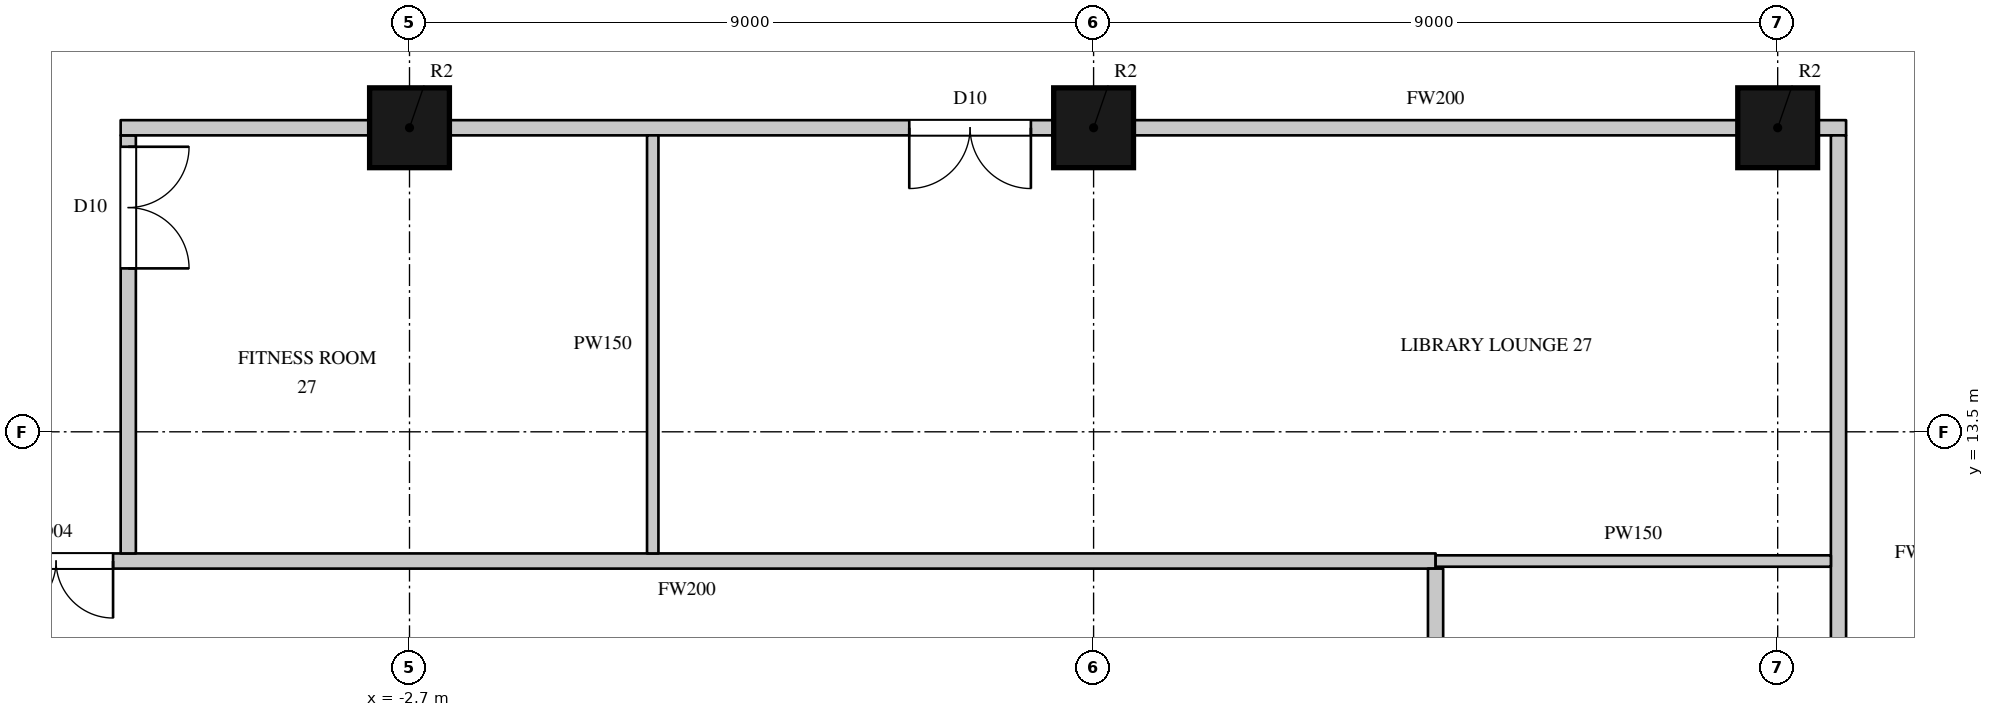
"""IFC4 building model, lengths in metres.
Left out: names, types, materials, properties, quantities, classifications, styles, units other than length and angle.
Written with IfcOpenShell. Run it as: python <this file> out.ifc"""

import sys

from ifc_helpers import new_model, si_unit, direction, frame, frame_2d, origin, origin_2d, place, context, subcontext, project, spatial, rectangle, circle, extrude, element, fill, save


model = new_model("IFC4")
c1 = context("Model", 3, precision=1e-05, world=origin(), true_north=direction((0.0, 1.0)))
c2 = subcontext(c1, "Body", "Model", "MODEL_VIEW")
j1 = project(units=[si_unit("LENGTHUNIT", "METRE"), si_unit("PLANEANGLEUNIT", "RADIAN")], contexts=[c1])
p1 = place(None, origin())
s1 = spatial("IfcSite", under=j1, at=p1, CompositionType="ELEMENT")
p2 = place(p1, origin())
s2 = spatial("IfcBuilding", under=s1, at=p2, CompositionType="ELEMENT")
p3 = place(p2, frame((0.0, 0.0, 127.5)))
s3 = spatial("IfcBuildingStorey", under=s2, at=p3, CompositionType="ELEMENT", Elevation=127.5)
for number, where, z_axis, x_axis in (
    (1, (-2.7, 17.5, 0.0), (0.0, 0.0, 1.0), (1.0, 0.0, 0.0)),
    (2, (6.3, 17.5, 0.0), (0.0, 0.0, 1.0), (1.0, 0.0, 0.0)),
    (3, (15.3, 17.5, 0.0), (0.0, 0.0, 1.0), (1.0, 0.0, 0.0)),
):
    element("IfcColumn", number, at=place(p3, frame(where, z_axis=z_axis, x_axis=x_axis)), inside=s3, PredefinedType="COLUMN", context=c2, shape_type="SweptSolid", body=[
        extrude(circle(Radius=0.525, at=origin_2d()), origin(), (0.0, 0.0, 1.0), 3.6),
    ])
p4 = place(p3, frame((-8.9, 11.8, 0.0), z_axis=(0.0, 0.0, 1.0), x_axis=(1.0, 0.0, 0.0)))
e4 = element("IfcWall", 4, at=p4, inside=s3, PredefinedType="PARTITIONING", context=c2, shape_type="SweptSolid", body=[
    extrude(rectangle(XDim=19.7, YDim=0.2, at=frame_2d((9.85, 0.0))), origin(), (0.0, 0.0, 1.0), 3.3),
])
p5 = place(p4, frame((0.8, 0.0, 0.0)))
e5 = element("IfcOpeningElement", 5, at=p5, cuts=e4, PredefinedType="OPENING", context=c2, shape_type="SweptSolid", body=[
    extrude(rectangle(XDim=1.5, YDim=2.2, at=frame_2d((0.75, 1.1))), frame((0.0, 0.11, 0.0), z_axis=(0.0, -1.0, 0.0), x_axis=(1.0, 0.0, 0.0)), (0.0, 0.0, 1.0), 0.22),
])
p6 = place(p3, frame((-6.4, 11.9, 0.0), z_axis=(0.0, 0.0, 1.0), x_axis=(0.0, 1.0, 0.0)))
e6 = element("IfcWall", 6, at=p6, inside=s3, PredefinedType="PARTITIONING", context=c2, shape_type="SweptSolid", body=[
    extrude(rectangle(XDim=5.5, YDim=0.2, at=frame_2d((2.75, 0.0))), origin(), (0.0, 0.0, 1.0), 3.3),
])
p7 = place(p6, frame((3.75, 0.0, 0.0)))
e7 = element("IfcOpeningElement", 7, at=p7, cuts=e6, PredefinedType="OPENING", context=c2, shape_type="SweptSolid", body=[
    extrude(rectangle(XDim=1.6, YDim=2.4, at=frame_2d((0.8, 1.2))), frame((0.0, 0.11, 0.0), z_axis=(0.0, -1.0, 0.0), x_axis=(1.0, 0.0, 0.0)), (0.0, 0.0, 1.0), 0.22),
])
p8 = place(p3, frame((-6.5, 17.5, 0.0), z_axis=(0.0, 0.0, 1.0), x_axis=(1.0, 0.0, 0.0)))
e8 = element("IfcWall", 8, at=p8, inside=s3, PredefinedType="PARTITIONING", context=c2, shape_type="SweptSolid", body=[
    extrude(rectangle(XDim=3.275, YDim=0.2, at=frame_2d((1.637, 0.0))), origin(), (0.0, 0.0, 1.0), 2.75),
])
p9 = place(p3, frame((-2.175, 17.5, 0.0), z_axis=(0.0, 0.0, 1.0), x_axis=(1.0, 0.0, 0.0)))
e9 = element("IfcWall", 9, at=p9, inside=s3, PredefinedType="PARTITIONING", context=c2, shape_type="SweptSolid", body=[
    extrude(rectangle(XDim=7.95, YDim=0.2, at=frame_2d((3.975, 0.0))), origin(), (0.0, 0.0, 1.0), 2.75),
])
p10 = place(p9, frame((6.05, 0.0, 0.0)))
e10 = element("IfcOpeningElement", 10, at=p10, cuts=e9, PredefinedType="OPENING", context=c2, shape_type="SweptSolid", body=[
    extrude(rectangle(XDim=1.6, YDim=2.4, at=frame_2d((0.8, 1.2))), frame((0.0, 0.11, 0.0), z_axis=(0.0, -1.0, 0.0), x_axis=(1.0, 0.0, 0.0)), (0.0, 0.0, 1.0), 0.22),
])
p11 = place(p3, frame((6.825, 17.5, 0.0), z_axis=(0.0, 0.0, 1.0), x_axis=(1.0, 0.0, 0.0)))
e11 = element("IfcWall", 11, at=p11, inside=s3, PredefinedType="PARTITIONING", context=c2, shape_type="SweptSolid", body=[
    extrude(rectangle(XDim=7.95, YDim=0.2, at=frame_2d((3.975, 0.0))), origin(), (0.0, 0.0, 1.0), 2.75),
])
p12 = place(p3, frame((15.825, 17.5, 0.0), z_axis=(0.0, 0.0, 1.0), x_axis=(1.0, 0.0, 0.0)))
e12 = element("IfcWall", 12, at=p12, inside=s3, PredefinedType="PARTITIONING", context=c2, shape_type="SweptSolid", body=[
    extrude(rectangle(XDim=0.375, YDim=0.2, at=frame_2d((0.188, 0.0))), origin(), (0.0, 0.0, 1.0), 3.3),
])
p13 = place(p3, frame((10.799, -12.5, 0.0), z_axis=(0.0, 0.0, 1.0), x_axis=(0.0, 1.0, 0.0)))
e13 = element("IfcWall", 13, at=p13, inside=s3, PredefinedType="PARTITIONING", context=c2, shape_type="SweptSolid", body=[
    extrude(rectangle(XDim=24.2, YDim=0.2, at=frame_2d((12.1, 0.0))), origin(), (0.0, 0.0, 1.0), 3.3),
])
p14 = place(p13, frame((13.15, 0.0, 0.0)))
e14 = element("IfcOpeningElement", 14, at=p14, cuts=e13, PredefinedType="OPENING", context=c2, shape_type="SweptSolid", body=[
    extrude(rectangle(XDim=1.5, YDim=2.2, at=frame_2d((0.75, 1.1))), frame((0.0, 0.11, 0.0), z_axis=(0.0, -1.0, 0.0), x_axis=(1.0, 0.0, 0.0)), (0.0, 0.0, 1.0), 0.22),
])
p15 = place(p3, frame((16.1, 6.825, 0.0), z_axis=(0.0, 0.0, 1.0), x_axis=(0.0, 1.0, 0.0)))
e15 = element("IfcWall", 15, at=p15, inside=s3, PredefinedType="PARTITIONING", context=c2, shape_type="SweptSolid", body=[
    extrude(rectangle(XDim=10.575, YDim=0.2, at=frame_2d((5.288, 0.0))), origin(), (0.0, 0.0, 1.0), 3.3),
])
p16 = place(p3, frame((0.5, 11.9, 0.0), z_axis=(0.0, 0.0, 1.0), x_axis=(0.0, 1.0, 0.0)))
e16 = element("IfcWall", 16, at=p16, inside=s3, PredefinedType="PARTITIONING", context=c2, shape_type="SweptSolid", body=[
    extrude(rectangle(XDim=5.5, YDim=0.15, at=frame_2d((2.75, 0.0))), origin(), (0.0, 0.0, 1.0), 3.3),
])
p17 = place(p3, frame((10.8, 11.8, 0.0), z_axis=(0.0, 0.0, 1.0), x_axis=(1.0, 0.0, 0.0)))
e17 = element("IfcWall", 17, at=p17, inside=s3, PredefinedType="PARTITIONING", context=c2, shape_type="SweptSolid", body=[
    extrude(rectangle(XDim=5.2, YDim=0.15, at=frame_2d((2.6, 0.0))), origin(), (0.0, 0.0, 1.0), 3.3),
])
p18 = place(p5, origin())
e18 = element("IfcDoor", 18, at=p18, inside=s3, OperationType="DOUBLE_DOOR_SINGLE_SWING", PredefinedType="DOOR", context=c2, shape_type="SweptSolid", body=[
    extrude(rectangle(XDim=1.5, YDim=2.2, at=frame_2d((0.75, 1.1))), frame((0.0, 0.025, 0.0), z_axis=(0.0, -1.0, 0.0), x_axis=(1.0, 0.0, 0.0)), (0.0, 0.0, 1.0), 0.05),
])
fill(e5, e18)
p19 = place(p7, origin())
e19 = element("IfcDoor", 19, at=p19, inside=s3, OperationType="DOUBLE_DOOR_SINGLE_SWING", PredefinedType="DOOR", context=c2, shape_type="SweptSolid", body=[
    extrude(rectangle(XDim=1.6, YDim=2.4, at=frame_2d((0.8, 1.2))), frame((0.0, 0.025, 0.0), z_axis=(0.0, -1.0, 0.0), x_axis=(1.0, 0.0, 0.0)), (0.0, 0.0, 1.0), 0.05),
])
fill(e7, e19)
p20 = place(p10, origin())
e20 = element("IfcDoor", 20, at=p20, inside=s3, OperationType="DOUBLE_DOOR_SINGLE_SWING", PredefinedType="DOOR", context=c2, shape_type="SweptSolid", body=[
    extrude(rectangle(XDim=1.6, YDim=2.4, at=frame_2d((0.8, 1.2))), frame((0.0, 0.025, 0.0), z_axis=(0.0, -1.0, 0.0), x_axis=(1.0, 0.0, 0.0)), (0.0, 0.0, 1.0), 0.05),
])
fill(e10, e20)
save(model, sys.argv[1])
